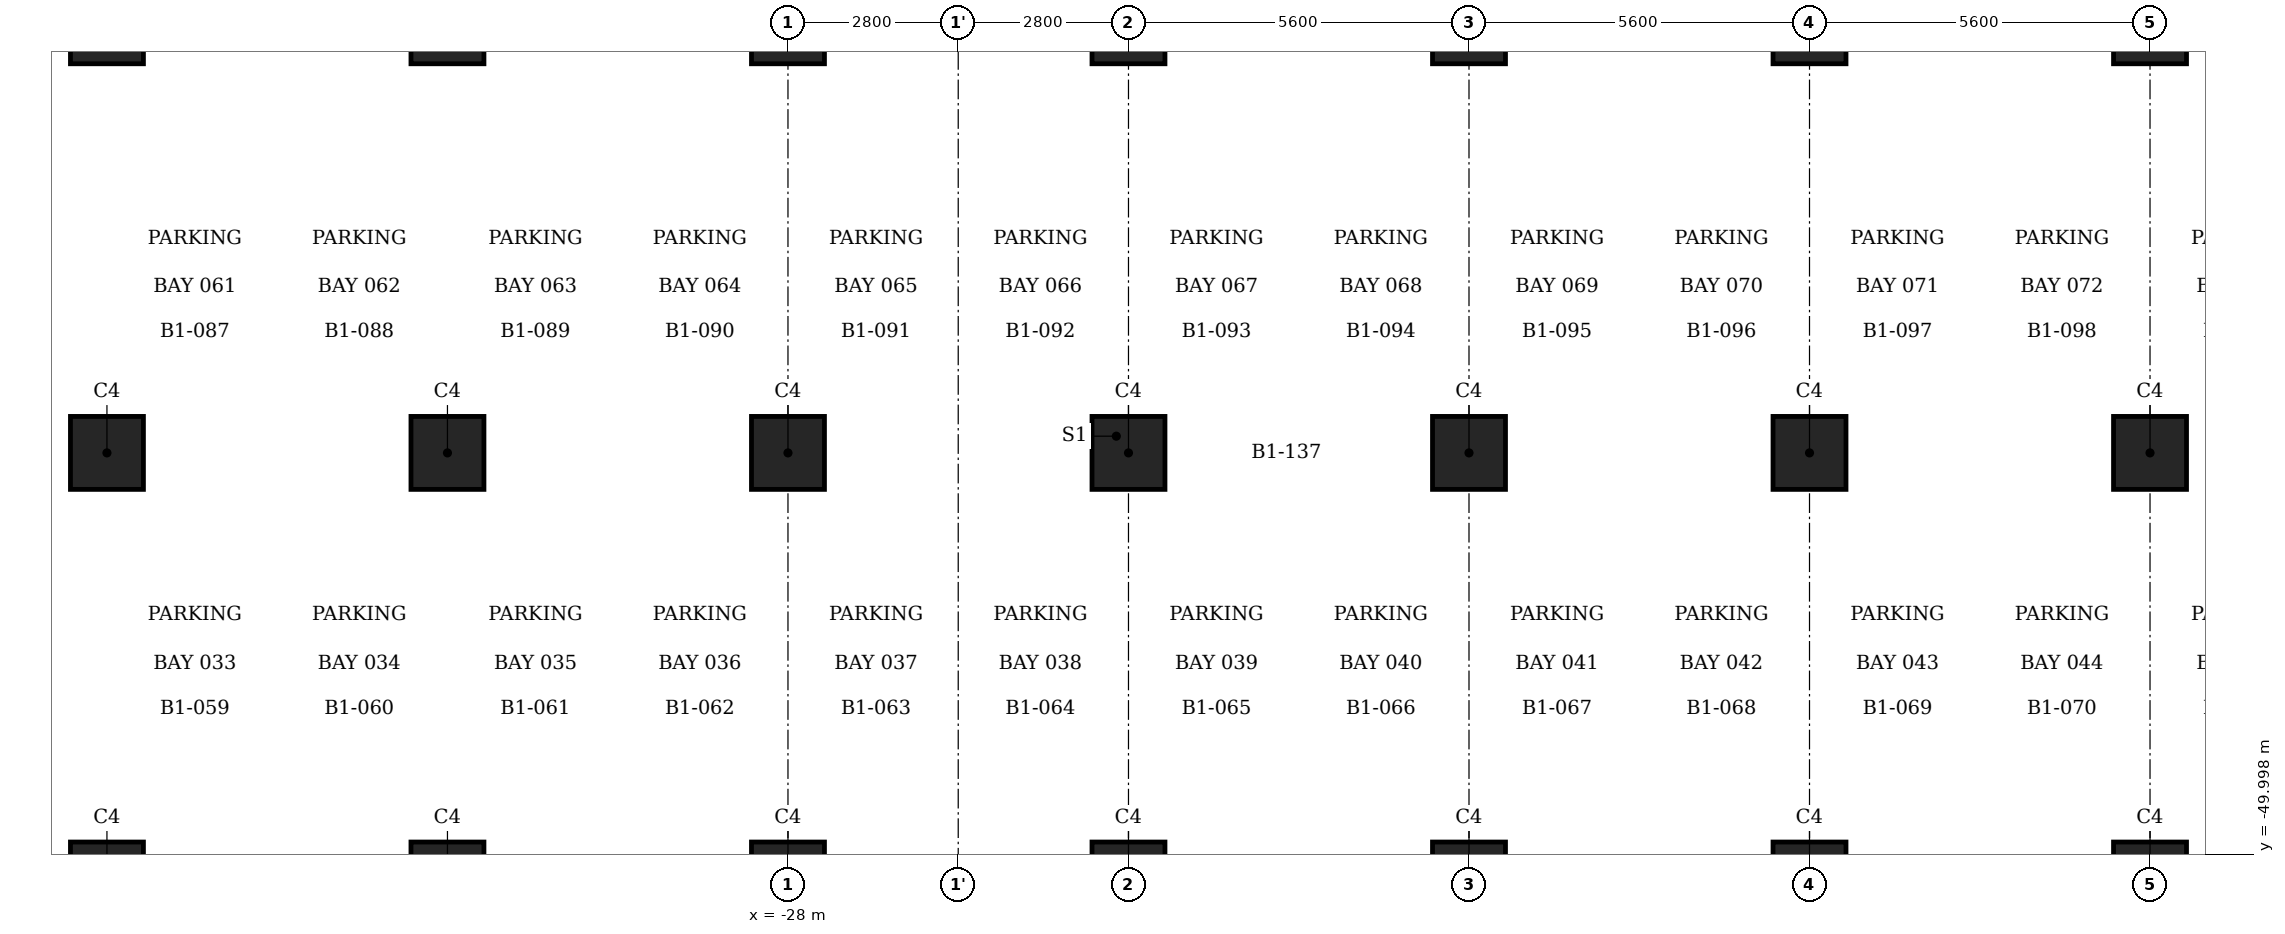
"""IFC4 building model, lengths in metres.
Left out: names, types, materials, properties, quantities, classifications, styles, units other than length and angle.
Written with IfcOpenShell. Run it as: python <this file> out.ifc"""

import sys

from ifc_helpers import new_model, si_unit, direction, frame, origin, origin_2d, place, context, subcontext, project, spatial, circle, extrude, element, save


model = new_model("IFC4")
c1 = context("Model", 3, precision=1e-05, world=origin(), true_north=direction((0.0, 1.0)))
c2 = subcontext(c1, "Body", "Model", "MODEL_VIEW")
j1 = project(units=[si_unit("LENGTHUNIT", "METRE"), si_unit("PLANEANGLEUNIT", "RADIAN")], contexts=[c1])
p1 = place(None, origin())
s1 = spatial("IfcSite", under=j1, at=p1, CompositionType="ELEMENT")
p2 = place(p1, origin())
s2 = spatial("IfcBuilding", under=s1, at=p2, CompositionType="ELEMENT")
p3 = place(p2, frame((0.0, 0.0, -4.5)))
s3 = spatial("IfcBuildingStorey", under=s2, at=p3, CompositionType="ELEMENT", Elevation=-4.5)
for number, where, z_axis, x_axis in (
    (1, (-39.2, -36.4, 0.0), (0.0, 0.0, 1.0), (1.0, 0.0, 0.0)),
    (2, (-33.6, -36.4, 0.0), (0.0, 0.0, 1.0), (1.0, 0.0, 0.0)),
    (3, (-28.0, -36.4, 0.0), (0.0, 0.0, 1.0), (1.0, 0.0, 0.0)),
    (4, (-22.4, -36.4, 0.0), (0.0, 0.0, 1.0), (1.0, 0.0, 0.0)),
    (5, (-16.8, -36.4, 0.0), (0.0, 0.0, 1.0), (1.0, 0.0, 0.0)),
    (6, (-11.2, -36.4, 0.0), (0.0, 0.0, 1.0), (1.0, 0.0, 0.0)),
    (7, (-5.6, -36.4, 0.0), (0.0, 0.0, 1.0), (1.0, 0.0, 0.0)),
    (8, (-39.2, -43.4, 0.0), (0.0, 0.0, 1.0), (1.0, 0.0, 0.0)),
    (9, (-33.6, -43.4, 0.0), (0.0, 0.0, 1.0), (1.0, 0.0, 0.0)),
    (10, (-28.0, -43.4, 0.0), (0.0, 0.0, 1.0), (1.0, 0.0, 0.0)),
    (11, (-22.4, -43.4, 0.0), (0.0, 0.0, 1.0), (1.0, 0.0, 0.0)),
    (12, (-16.8, -43.4, 0.0), (0.0, 0.0, 1.0), (1.0, 0.0, 0.0)),
    (13, (-11.2, -43.4, 0.0), (0.0, 0.0, 1.0), (1.0, 0.0, 0.0)),
    (14, (-5.6, -43.4, 0.0), (0.0, 0.0, 1.0), (1.0, 0.0, 0.0)),
    (15, (-39.2, -50.4, 0.0), (0.0, 0.0, 1.0), (1.0, 0.0, 0.0)),
    (16, (-33.6, -50.4, 0.0), (0.0, 0.0, 1.0), (1.0, 0.0, 0.0)),
    (17, (-28.0, -50.4, 0.0), (0.0, 0.0, 1.0), (1.0, 0.0, 0.0)),
    (18, (-22.4, -50.4, 0.0), (0.0, 0.0, 1.0), (1.0, 0.0, 0.0)),
    (19, (-16.8, -50.4, 0.0), (0.0, 0.0, 1.0), (1.0, 0.0, 0.0)),
    (20, (-11.2, -50.4, 0.0), (0.0, 0.0, 1.0), (1.0, 0.0, 0.0)),
    (21, (-5.6, -50.4, 0.0), (0.0, 0.0, 1.0), (1.0, 0.0, 0.0)),
):
    element("IfcColumn", number, at=place(p3, frame(where, z_axis=z_axis, x_axis=x_axis)), inside=s3, PredefinedType="COLUMN", context=c2, shape_type="SweptSolid", body=[
        extrude(circle(Radius=0.6, at=origin_2d()), origin(), (0.0, 0.0, 1.0), 4.5),
    ])
save(model, sys.argv[1])
